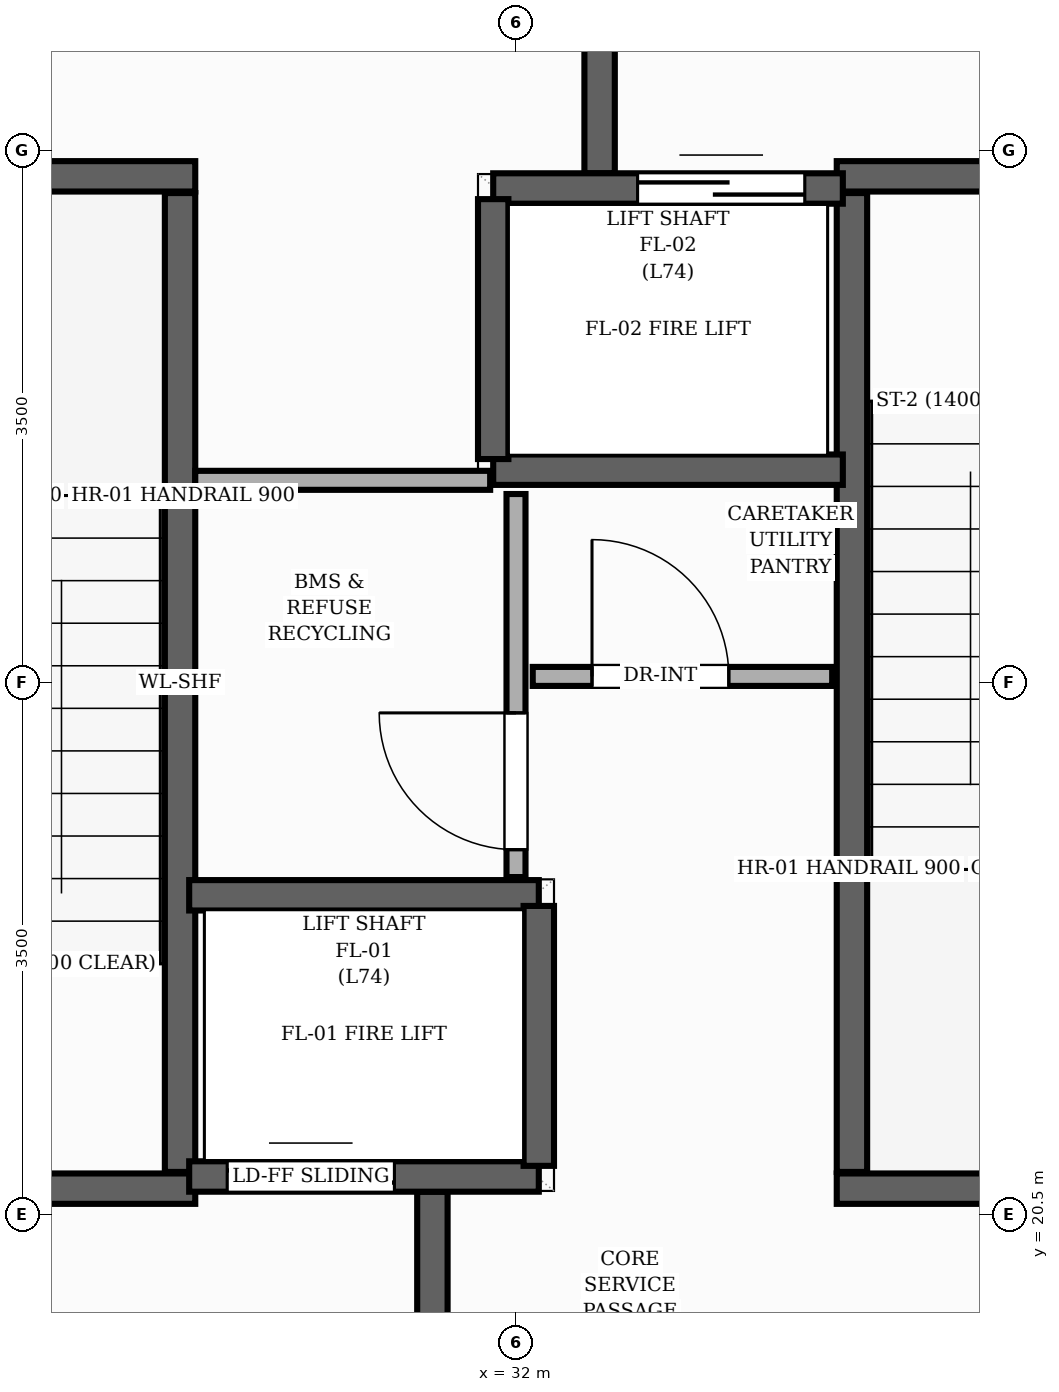
"""IFC4 building model, lengths in metres.
Left out: names, types, materials, properties, quantities, classifications, styles, units other than length and angle.
Written with IfcOpenShell. Run it as: python <this file> out.ifc"""

import sys

from ifc_helpers import new_model, si_unit, direction, frame, frame_2d, origin, place, context, subcontext, project, spatial, rectangle, extrude, element, fill, save


model = new_model("IFC4")
c1 = context("Model", 3, precision=1e-05, world=origin(), true_north=direction((0.0, 1.0)))
c2 = subcontext(c1, "Body", "Model", "MODEL_VIEW")
j1 = project(units=[si_unit("LENGTHUNIT", "METRE"), si_unit("PLANEANGLEUNIT", "RADIAN")], contexts=[c1])
p1 = place(None, origin())
s1 = spatial("IfcSite", under=j1, at=p1, CompositionType="ELEMENT")
p2 = place(p1, origin())
s2 = spatial("IfcBuilding", under=s1, at=p2, CompositionType="ELEMENT")
p3 = place(p2, frame((0.0, 0.0, 246.88)))
s3 = spatial("IfcBuildingStorey", under=s2, at=p3, CompositionType="ELEMENT", Elevation=246.88)
p4 = place(p3, frame((29.79, 20.78, 0.0), z_axis=(0.0, 0.0, 1.0), x_axis=(0.0, 1.0, 0.0)))
e1 = element("IfcWall", 1, at=p4, inside=s3, PredefinedType="SHEAR", context=c2, shape_type="SweptSolid", body=[
    extrude(rectangle(XDim=6.44, YDim=0.2, at=frame_2d((3.22, 0.0))), origin(), (0.0, 0.0, 1.0), 4.16),
])
p5 = place(p3, frame((26.65, 27.33, 0.0), z_axis=(0.0, 0.0, 1.0), x_axis=(1.0, 0.0, 0.0)))
e2 = element("IfcWall", 2, at=p5, inside=s3, PredefinedType="SHEAR", context=c2, shape_type="SweptSolid", body=[
    extrude(rectangle(XDim=3.24, YDim=0.2, at=frame_2d((1.62, 0.0))), origin(), (0.0, 0.0, 1.0), 4.16),
])
p6 = place(p3, frame((26.65, 20.67, 0.0), z_axis=(0.0, 0.0, 1.0), x_axis=(1.0, 0.0, 0.0)))
e3 = element("IfcWall", 3, at=p6, inside=s3, PredefinedType="SHEAR", context=c2, shape_type="SweptSolid", body=[
    extrude(rectangle(XDim=3.24, YDim=0.2, at=frame_2d((1.62, 0.0))), origin(), (0.0, 0.0, 1.0), 4.16),
])
p7 = place(p6, frame((1.055, 0.0, 0.0)))
e4 = element("IfcOpeningElement", 4, at=p7, cuts=e3, PredefinedType="OPENING", context=c2, shape_type="SweptSolid", body=[
    extrude(rectangle(XDim=1.05, YDim=2.15, at=frame_2d((0.525, 1.075))), frame((0.0, 0.11, 0.0), z_axis=(0.0, -1.0, 0.0), x_axis=(1.0, 0.0, 0.0)), (0.0, 0.0, 1.0), 0.22),
])
p8 = place(p3, frame((34.21, 20.78, 0.0), z_axis=(0.0, 0.0, 1.0), x_axis=(0.0, 1.0, 0.0)))
e5 = element("IfcWall", 5, at=p8, inside=s3, PredefinedType="SHEAR", context=c2, shape_type="SweptSolid", body=[
    extrude(rectangle(XDim=6.44, YDim=0.2, at=frame_2d((3.22, 0.0))), origin(), (0.0, 0.0, 1.0), 4.16),
])
p9 = place(p3, frame((34.11, 20.67, 0.0), z_axis=(0.0, 0.0, 1.0), x_axis=(1.0, 0.0, 0.0)))
e6 = element("IfcWall", 6, at=p9, inside=s3, PredefinedType="SHEAR", context=c2, shape_type="SweptSolid", body=[
    extrude(rectangle(XDim=3.24, YDim=0.2, at=frame_2d((1.62, 0.0))), origin(), (0.0, 0.0, 1.0), 4.16),
])
p10 = place(p3, frame((34.11, 27.33, 0.0), z_axis=(0.0, 0.0, 1.0), x_axis=(1.0, 0.0, 0.0)))
e7 = element("IfcWall", 7, at=p10, inside=s3, PredefinedType="SHEAR", context=c2, shape_type="SweptSolid", body=[
    extrude(rectangle(XDim=3.24, YDim=0.2, at=frame_2d((1.62, 0.0))), origin(), (0.0, 0.0, 1.0), 4.16),
])
p11 = place(p10, frame((1.135, 0.0, 0.0)))
e8 = element("IfcOpeningElement", 8, at=p11, cuts=e7, PredefinedType="OPENING", context=c2, shape_type="SweptSolid", body=[
    extrude(rectangle(XDim=1.05, YDim=2.15, at=frame_2d((0.525, 1.075))), frame((0.0, 0.11, 0.0), z_axis=(0.0, -1.0, 0.0), x_axis=(1.0, 0.0, 0.0)), (0.0, 0.0, 1.0), 0.22),
])
for number, where, z_axis, x_axis in (
    (9, (31.45, 17.15, 0.0), (0.0, 0.0, 1.0), (0.0, 1.0, 0.0)),
    (10, (32.55, 27.35, 0.0), (0.0, 0.0, 1.0), (0.0, 1.0, 0.0)),
):
    element("IfcWall", number, at=place(p3, frame(where, z_axis=z_axis, x_axis=x_axis)), inside=s3, PredefinedType="SHEAR", context=c2, shape_type="SweptSolid", body=[
        extrude(rectangle(XDim=3.5, YDim=0.2, at=frame_2d((1.75, 0.0))), origin(), (0.0, 0.0, 1.0), 4.16),
    ])
p12 = place(p3, frame((29.85, 20.75, 0.0), z_axis=(0.0, 0.0, 1.0), x_axis=(1.0, 0.0, 0.0)))
e11 = element("IfcWall", 11, at=p12, inside=s3, PredefinedType="SHEAR", context=c2, shape_type="SweptSolid", body=[
    extrude(rectangle(XDim=2.3, YDim=0.2, at=frame_2d((1.15, 0.0))), origin(), (0.0, 0.0, 1.0), 4.16),
])
p13 = place(p12, frame((0.25, 0.0, 0.0)))
e12 = element("IfcOpeningElement", 12, at=p13, cuts=e11, PredefinedType="OPENING", context=c2, shape_type="SweptSolid", body=[
    extrude(rectangle(XDim=1.1, YDim=2.15, at=frame_2d((0.55, 1.075))), frame((0.0, 0.11, 0.0), z_axis=(0.0, -1.0, 0.0), x_axis=(1.0, 0.0, 0.0)), (0.0, 0.0, 1.0), 0.22),
])
p14 = place(p3, frame((29.85, 22.6, 0.0), z_axis=(0.0, 0.0, 1.0), x_axis=(1.0, 0.0, 0.0)))
e13 = element("IfcWall", 13, at=p14, inside=s3, PredefinedType="SHEAR", context=c2, shape_type="SweptSolid", body=[
    extrude(rectangle(XDim=2.3, YDim=0.2, at=frame_2d((1.15, 0.0))), origin(), (0.0, 0.0, 1.0), 4.16),
])
p15 = place(p3, frame((32.15, 20.82, 0.0), z_axis=(0.0, 0.0, 1.0), x_axis=(0.0, 1.0, 0.0)))
e14 = element("IfcWall", 14, at=p15, inside=s3, PredefinedType="SHEAR", context=c2, shape_type="SweptSolid", body=[
    extrude(rectangle(XDim=1.71, YDim=0.2, at=frame_2d((0.855, 0.0))), origin(), (0.0, 0.0, 1.0), 4.16),
])
p16 = place(p3, frame((31.85, 27.25, 0.0), z_axis=(0.0, 0.0, 1.0), x_axis=(1.0, 0.0, 0.0)))
e15 = element("IfcWall", 15, at=p16, inside=s3, PredefinedType="SHEAR", context=c2, shape_type="SweptSolid", body=[
    extrude(rectangle(XDim=2.3, YDim=0.2, at=frame_2d((1.15, 0.0))), origin(), (0.0, 0.0, 1.0), 4.16),
])
p17 = place(p16, frame((0.95, 0.0, 0.0)))
e16 = element("IfcOpeningElement", 16, at=p17, cuts=e15, PredefinedType="OPENING", context=c2, shape_type="SweptSolid", body=[
    extrude(rectangle(XDim=1.1, YDim=2.15, at=frame_2d((0.55, 1.075))), frame((0.0, 0.11, 0.0), z_axis=(0.0, -1.0, 0.0), x_axis=(1.0, 0.0, 0.0)), (0.0, 0.0, 1.0), 0.22),
])
p18 = place(p3, frame((31.85, 25.4, 0.0), z_axis=(0.0, 0.0, 1.0), x_axis=(1.0, 0.0, 0.0)))
e17 = element("IfcWall", 17, at=p18, inside=s3, PredefinedType="SHEAR", context=c2, shape_type="SweptSolid", body=[
    extrude(rectangle(XDim=2.3, YDim=0.2, at=frame_2d((1.15, 0.0))), origin(), (0.0, 0.0, 1.0), 4.16),
])
p19 = place(p3, frame((31.85, 25.47, 0.0), z_axis=(0.0, 0.0, 1.0), x_axis=(0.0, 1.0, 0.0)))
e18 = element("IfcWall", 18, at=p19, inside=s3, PredefinedType="SHEAR", context=c2, shape_type="SweptSolid", body=[
    extrude(rectangle(XDim=1.71, YDim=0.2, at=frame_2d((0.855, 0.0))), origin(), (0.0, 0.0, 1.0), 4.16),
])
p20 = place(p3, frame((32.0, 22.72, 0.0), z_axis=(0.0, 0.0, 1.0), x_axis=(0.0, 1.0, 0.0)))
e19 = element("IfcWall", 19, at=p20, inside=s3, PredefinedType="PARTITIONING", context=c2, shape_type="SweptSolid", body=[
    extrude(rectangle(XDim=2.52, YDim=0.125, at=frame_2d((1.26, 0.0))), origin(), (0.0, 0.0, 1.0), 3.835),
])
p21 = place(p20, frame((0.18, 0.0, 0.0)))
e20 = element("IfcOpeningElement", 20, at=p21, cuts=e19, PredefinedType="OPENING", context=c2, shape_type="SweptSolid", body=[
    extrude(rectangle(XDim=0.9, YDim=2.1, at=frame_2d((0.45, 1.05))), frame((0.0, 0.073, 0.0), z_axis=(0.0, -1.0, 0.0), x_axis=(1.0, 0.0, 0.0)), (0.0, 0.0, 1.0), 0.145),
])
p22 = place(p3, frame((32.11, 24.04, 0.0), z_axis=(0.0, 0.0, 1.0), x_axis=(1.0, 0.0, 0.0)))
e21 = element("IfcWall", 21, at=p22, inside=s3, PredefinedType="PARTITIONING", context=c2, shape_type="SweptSolid", body=[
    extrude(rectangle(XDim=1.97, YDim=0.125, at=frame_2d((0.985, 0.0))), origin(), (0.0, 0.0, 1.0), 3.835),
])
p23 = place(p22, frame((0.39, 0.0, 0.0)))
e22 = element("IfcOpeningElement", 22, at=p23, cuts=e21, PredefinedType="OPENING", context=c2, shape_type="SweptSolid", body=[
    extrude(rectangle(XDim=0.9, YDim=2.1, at=frame_2d((0.45, 1.05))), frame((0.0, 0.073, 0.0), z_axis=(0.0, -1.0, 0.0), x_axis=(1.0, 0.0, 0.0)), (0.0, 0.0, 1.0), 0.145),
])
p24 = place(p3, frame((29.89, 25.33, 0.0), z_axis=(0.0, 0.0, 1.0), x_axis=(1.0, 0.0, 0.0)))
e23 = element("IfcWall", 23, at=p24, inside=s3, PredefinedType="PARTITIONING", context=c2, shape_type="SweptSolid", body=[
    extrude(rectangle(XDim=1.94, YDim=0.125, at=frame_2d((0.97, 0.0))), origin(), (0.0, 0.0, 1.0), 3.835),
])
p25 = place(p13, origin())
e24 = element("IfcDoor", 24, at=p25, inside=s3, OperationType="DOUBLE_DOOR_SLIDING", PredefinedType="DOOR", context=c2, shape_type="SweptSolid", body=[
    extrude(rectangle(XDim=1.1, YDim=2.15, at=frame_2d((0.55, 1.075))), frame((0.0, 0.025, 0.0), z_axis=(0.0, -1.0, 0.0), x_axis=(1.0, 0.0, 0.0)), (0.0, 0.0, 1.0), 0.05),
])
fill(e12, e24)
p26 = place(p17, origin())
e25 = element("IfcDoor", 25, at=p26, inside=s3, OperationType="DOUBLE_DOOR_SLIDING", PredefinedType="DOOR", context=c2, shape_type="SweptSolid", body=[
    extrude(rectangle(XDim=1.1, YDim=2.15, at=frame_2d((0.55, 1.075))), frame((0.0, 0.025, 0.0), z_axis=(0.0, -1.0, 0.0), x_axis=(1.0, 0.0, 0.0)), (0.0, 0.0, 1.0), 0.05),
])
fill(e16, e25)
p27 = place(p23, origin())
e26 = element("IfcDoor", 26, at=p27, inside=s3, OperationType="SINGLE_SWING_LEFT", PredefinedType="DOOR", context=c2, shape_type="SweptSolid", body=[
    extrude(rectangle(XDim=0.9, YDim=2.1, at=frame_2d((0.45, 1.05))), frame((0.0, 0.025, 0.0), z_axis=(0.0, -1.0, 0.0), x_axis=(1.0, 0.0, 0.0)), (0.0, 0.0, 1.0), 0.05),
])
fill(e22, e26)
p28 = place(p21, origin())
e27 = element("IfcDoor", 27, at=p28, inside=s3, OperationType="SINGLE_SWING_RIGHT", PredefinedType="DOOR", context=c2, shape_type="SweptSolid", body=[
    extrude(rectangle(XDim=0.9, YDim=2.1, at=frame_2d((0.45, 1.05))), frame((0.0, 0.025, 0.0), z_axis=(0.0, -1.0, 0.0), x_axis=(1.0, 0.0, 0.0)), (0.0, 0.0, 1.0), 0.05),
])
fill(e20, e27)
save(model, sys.argv[1])
